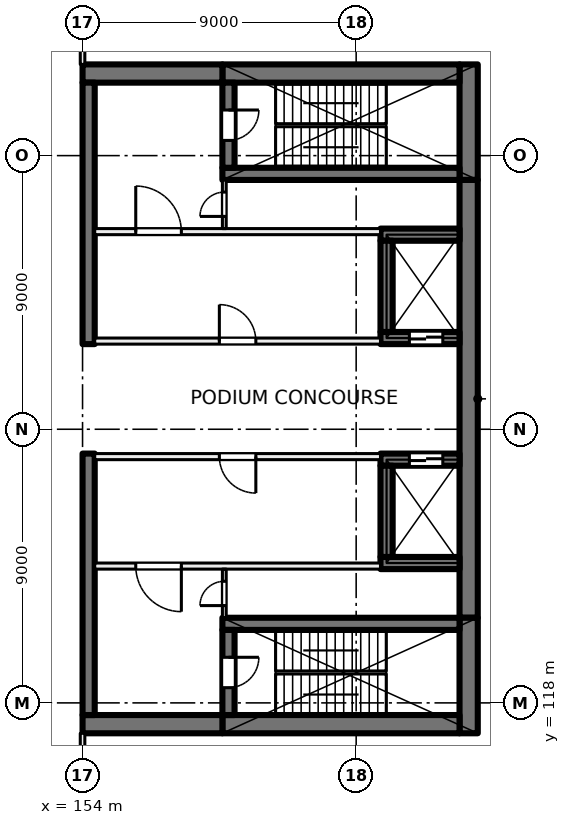
"""IFC4 building model, lengths in metres.
Left out: names, types, materials, properties, quantities, classifications, styles, units other than length and angle.
Written with IfcOpenShell. Run it as: python <this file> out.ifc"""

import sys

from ifc_helpers import new_model, si_unit, direction, frame, frame_2d, origin, place, context, subcontext, project, spatial, rectangle, extrude, element, fill, save


model = new_model("IFC4")
c1 = context("Model", 3, precision=1e-05, world=origin(), true_north=direction((0.0, 1.0)))
c2 = subcontext(c1, "Body", "Model", "MODEL_VIEW")
j1 = project(units=[si_unit("LENGTHUNIT", "METRE"), si_unit("PLANEANGLEUNIT", "RADIAN")], contexts=[c1])
p1 = place(None, origin())
s1 = spatial("IfcSite", under=j1, at=p1, CompositionType="ELEMENT")
p2 = place(p1, origin())
s2 = spatial("IfcBuilding", under=s1, at=p2, CompositionType="ELEMENT")
p3 = place(p2, frame((0.0, 0.0, 7.5)))
s3 = spatial("IfcBuildingStorey", under=s2, at=p3, CompositionType="ELEMENT", Elevation=7.5)
p4 = place(p3, frame((166.7, 139.0, 0.0), z_axis=(0.0, 0.0, 1.0), x_axis=(0.0, -1.0, 0.0)))
e1 = element("IfcWall", 1, at=p4, inside=s3, PredefinedType="SHEAR", context=c2, shape_type="SweptSolid", body=[
    extrude(rectangle(XDim=3.8, YDim=0.6, at=frame_2d((1.9, 0.0))), origin(), (0.0, 0.0, 1.0), 5.0),
])
p5 = place(p3, frame((166.7, 135.2, 0.0), z_axis=(0.0, 0.0, 1.0), x_axis=(0.0, -1.0, 0.0)))
e2 = element("IfcWall", 2, at=p5, inside=s3, PredefinedType="SHEAR", context=c2, shape_type="SweptSolid", body=[
    extrude(rectangle(XDim=14.4, YDim=0.6, at=frame_2d((7.2, 0.0))), origin(), (0.0, 0.0, 1.0), 5.0),
])
p6 = place(p3, frame((166.7, 120.8, 0.0), z_axis=(0.0, 0.0, 1.0), x_axis=(0.0, -1.0, 0.0)))
e3 = element("IfcWall", 3, at=p6, inside=s3, PredefinedType="SHEAR", context=c2, shape_type="SweptSolid", body=[
    extrude(rectangle(XDim=3.8, YDim=0.6, at=frame_2d((1.9, 0.0))), origin(), (0.0, 0.0, 1.0), 5.0),
])
for number, where, z_axis, x_axis in (
    (4, (166.4, 138.7, 0.0), (0.0, 0.0, 1.0), (-1.0, 0.0, 0.0)),
    (5, (166.4, 117.3, 0.0), (0.0, 0.0, 1.0), (-1.0, 0.0, 0.0)),
):
    element("IfcWall", number, at=place(p3, frame(where, z_axis=z_axis, x_axis=x_axis)), inside=s3, PredefinedType="SHEAR", context=c2, shape_type="SweptSolid", body=[
        extrude(rectangle(XDim=7.8, YDim=0.6, at=frame_2d((3.9, 0.0))), origin(), (0.0, 0.0, 1.0), 5.0),
    ])
for number, where, z_axis, x_axis in (
    (6, (158.6, 138.7, 0.0), (0.0, 0.0, 1.0), (-1.0, 0.0, 0.0)),
    (7, (158.6, 117.3, 0.0), (0.0, 0.0, 1.0), (-1.0, 0.0, 0.0)),
):
    element("IfcWall", number, at=place(p3, frame(where, z_axis=z_axis, x_axis=x_axis)), inside=s3, PredefinedType="SHEAR", context=c2, shape_type="SweptSolid", body=[
        extrude(rectangle(XDim=4.6, YDim=0.6, at=frame_2d((2.3, 0.0))), origin(), (0.0, 0.0, 1.0), 5.0),
    ])
p7 = place(p3, frame((166.4, 135.4, 0.0), z_axis=(0.0, 0.0, 1.0), x_axis=(-1.0, 0.0, 0.0)))
e8 = element("IfcWall", 8, at=p7, inside=s3, PredefinedType="SHEAR", context=c2, shape_type="SweptSolid", body=[
    extrude(rectangle(XDim=7.8, YDim=0.4, at=frame_2d((3.9, 0.0))), origin(), (0.0, 0.0, 1.0), 5.0),
])
p8 = place(p3, frame((158.8, 138.4, 0.0), z_axis=(0.0, 0.0, 1.0), x_axis=(0.0, -1.0, 0.0)))
e9 = element("IfcWall", 9, at=p8, inside=s3, PredefinedType="SHEAR", context=c2, shape_type="SweptSolid", body=[
    extrude(rectangle(XDim=2.8, YDim=0.4, at=frame_2d((1.4, 0.0))), origin(), (0.0, 0.0, 1.0), 5.0),
])
p9 = place(p8, frame((0.9, 0.0, 0.0)))
e10 = element("IfcOpeningElement", 10, at=p9, cuts=e9, PredefinedType="OPENING", context=c2, shape_type="SweptSolid", body=[
    extrude(rectangle(XDim=1.0, YDim=2.1, at=frame_2d((0.5, 1.05))), frame((0.0, 0.21, 0.0), z_axis=(0.0, -1.0, 0.0), x_axis=(1.0, 0.0, 0.0)), (0.0, 0.0, 1.0), 0.42),
])
p10 = place(p3, frame((166.4, 120.6, 0.0), z_axis=(0.0, 0.0, 1.0), x_axis=(-1.0, 0.0, 0.0)))
e11 = element("IfcWall", 11, at=p10, inside=s3, PredefinedType="SHEAR", context=c2, shape_type="SweptSolid", body=[
    extrude(rectangle(XDim=7.8, YDim=0.4, at=frame_2d((3.9, 0.0))), origin(), (0.0, 0.0, 1.0), 5.0),
])
p11 = place(p3, frame((158.8, 120.4, 0.0), z_axis=(0.0, 0.0, 1.0), x_axis=(0.0, -1.0, 0.0)))
e12 = element("IfcWall", 12, at=p11, inside=s3, PredefinedType="SHEAR", context=c2, shape_type="SweptSolid", body=[
    extrude(rectangle(XDim=2.8, YDim=0.4, at=frame_2d((1.4, 0.0))), origin(), (0.0, 0.0, 1.0), 5.0),
])
p12 = place(p11, frame((0.9, 0.0, 0.0)))
e13 = element("IfcOpeningElement", 13, at=p12, cuts=e12, PredefinedType="OPENING", context=c2, shape_type="SweptSolid", body=[
    extrude(rectangle(XDim=1.0, YDim=2.1, at=frame_2d((0.5, 1.05))), frame((0.0, 0.21, 0.0), z_axis=(0.0, -1.0, 0.0), x_axis=(1.0, 0.0, 0.0)), (0.0, 0.0, 1.0), 0.42),
])
p13 = place(p3, frame((166.4, 130.0, 0.0), z_axis=(0.0, 0.0, 1.0), x_axis=(-1.0, 0.0, 0.0)))
e14 = element("IfcWall", 14, at=p13, inside=s3, PredefinedType="SHEAR", context=c2, shape_type="SweptSolid", body=[
    extrude(rectangle(XDim=2.6, YDim=0.4, at=frame_2d((1.3, 0.0))), origin(), (0.0, 0.0, 1.0), 5.0),
])
p14 = place(p13, frame((0.55, 0.0, 0.0)))
e15 = element("IfcOpeningElement", 15, at=p14, cuts=e14, PredefinedType="OPENING", context=c2, shape_type="SweptSolid", body=[
    extrude(rectangle(XDim=1.1, YDim=2.1, at=frame_2d((0.55, 1.05))), frame((0.0, 0.21, 0.0), z_axis=(0.0, -1.0, 0.0), x_axis=(1.0, 0.0, 0.0)), (0.0, 0.0, 1.0), 0.42),
])
p15 = place(p3, frame((166.4, 133.4, 0.0), z_axis=(0.0, 0.0, 1.0), x_axis=(-1.0, 0.0, 0.0)))
e16 = element("IfcWall", 16, at=p15, inside=s3, PredefinedType="SHEAR", context=c2, shape_type="SweptSolid", body=[
    extrude(rectangle(XDim=2.6, YDim=0.4, at=frame_2d((1.3, 0.0))), origin(), (0.0, 0.0, 1.0), 5.0),
])
p16 = place(p3, frame((164.0, 133.2, 0.0), z_axis=(0.0, 0.0, 1.0), x_axis=(0.0, -1.0, 0.0)))
e17 = element("IfcWall", 17, at=p16, inside=s3, PredefinedType="SHEAR", context=c2, shape_type="SweptSolid", body=[
    extrude(rectangle(XDim=3.0, YDim=0.4, at=frame_2d((1.5, 0.0))), origin(), (0.0, 0.0, 1.0), 5.0),
])
p17 = place(p3, frame((166.4, 126.0, 0.0), z_axis=(0.0, 0.0, 1.0), x_axis=(-1.0, 0.0, 0.0)))
e18 = element("IfcWall", 18, at=p17, inside=s3, PredefinedType="SHEAR", context=c2, shape_type="SweptSolid", body=[
    extrude(rectangle(XDim=2.6, YDim=0.4, at=frame_2d((1.3, 0.0))), origin(), (0.0, 0.0, 1.0), 5.0),
])
p18 = place(p17, frame((0.55, 0.0, 0.0)))
e19 = element("IfcOpeningElement", 19, at=p18, cuts=e18, PredefinedType="OPENING", context=c2, shape_type="SweptSolid", body=[
    extrude(rectangle(XDim=1.1, YDim=2.1, at=frame_2d((0.55, 1.05))), frame((0.0, 0.21, 0.0), z_axis=(0.0, -1.0, 0.0), x_axis=(1.0, 0.0, 0.0)), (0.0, 0.0, 1.0), 0.42),
])
p19 = place(p3, frame((166.4, 122.6, 0.0), z_axis=(0.0, 0.0, 1.0), x_axis=(-1.0, 0.0, 0.0)))
e20 = element("IfcWall", 20, at=p19, inside=s3, PredefinedType="SHEAR", context=c2, shape_type="SweptSolid", body=[
    extrude(rectangle(XDim=2.6, YDim=0.4, at=frame_2d((1.3, 0.0))), origin(), (0.0, 0.0, 1.0), 5.0),
])
p20 = place(p3, frame((164.0, 125.8, 0.0), z_axis=(0.0, 0.0, 1.0), x_axis=(0.0, -1.0, 0.0)))
e21 = element("IfcWall", 21, at=p20, inside=s3, PredefinedType="SHEAR", context=c2, shape_type="SweptSolid", body=[
    extrude(rectangle(XDim=3.0, YDim=0.4, at=frame_2d((1.5, 0.0))), origin(), (0.0, 0.0, 1.0), 5.0),
])
for number, where, z_axis, x_axis in (
    (22, (154.2, 138.4, 0.0), (0.0, 0.0, 1.0), (0.0, -1.0, 0.0)),
    (23, (154.2, 126.2, 0.0), (0.0, 0.0, 1.0), (0.0, -1.0, 0.0)),
):
    element("IfcWall", number, at=place(p3, frame(where, z_axis=z_axis, x_axis=x_axis)), inside=s3, PredefinedType="SHEAR", context=c2, shape_type="SweptSolid", body=[
        extrude(rectangle(XDim=8.6, YDim=0.4, at=frame_2d((4.3, 0.0))), origin(), (0.0, 0.0, 1.0), 5.0),
    ])
p21 = place(p3, frame((163.8, 126.1, 0.0), z_axis=(0.0, 0.0, 1.0), x_axis=(-1.0, 0.0, 0.0)))
e24 = element("IfcWall", 24, at=p21, inside=s3, PredefinedType="PARTITIONING", context=c2, shape_type="SweptSolid", body=[
    extrude(rectangle(XDim=9.4, YDim=0.2, at=frame_2d((4.7, 0.0))), origin(), (0.0, 0.0, 1.0), 4.6),
])
p22 = place(p21, frame((4.1, 0.0, 0.0)))
e25 = element("IfcOpeningElement", 25, at=p22, cuts=e24, PredefinedType="OPENING", context=c2, shape_type="SweptSolid", body=[
    extrude(rectangle(XDim=1.2, YDim=2.1, at=frame_2d((0.6, 1.05))), frame((0.0, 0.11, 0.0), z_axis=(0.0, -1.0, 0.0), x_axis=(1.0, 0.0, 0.0)), (0.0, 0.0, 1.0), 0.22),
])
p23 = place(p3, frame((163.8, 122.5, 0.0), z_axis=(0.0, 0.0, 1.0), x_axis=(-1.0, 0.0, 0.0)))
e26 = element("IfcWall", 26, at=p23, inside=s3, PredefinedType="PARTITIONING", context=c2, shape_type="SweptSolid", body=[
    extrude(rectangle(XDim=9.4, YDim=0.2, at=frame_2d((4.7, 0.0))), origin(), (0.0, 0.0, 1.0), 4.6),
])
p24 = place(p23, frame((6.55, 0.0, 0.0)))
e27 = element("IfcOpeningElement", 27, at=p24, cuts=e26, PredefinedType="OPENING", context=c2, shape_type="SweptSolid", body=[
    extrude(rectangle(XDim=1.5, YDim=2.1, at=frame_2d((0.75, 1.05))), frame((0.0, 0.11, 0.0), z_axis=(0.0, -1.0, 0.0), x_axis=(1.0, 0.0, 0.0)), (0.0, 0.0, 1.0), 0.22),
])
p25 = place(p3, frame((158.663, 120.8, 0.0), z_axis=(0.0, 0.0, 1.0), x_axis=(0.0, 1.0, 0.0)))
e28 = element("IfcWall", 28, at=p25, inside=s3, PredefinedType="PARTITIONING", context=c2, shape_type="SweptSolid", body=[
    extrude(rectangle(XDim=1.6, YDim=0.125, at=frame_2d((0.8, 0.0))), origin(), (0.0, 0.0, 1.0), 4.6),
])
p26 = place(p25, frame((0.4, 0.0, 0.0)))
e29 = element("IfcOpeningElement", 29, at=p26, cuts=e28, PredefinedType="OPENING", context=c2, shape_type="SweptSolid", body=[
    extrude(rectangle(XDim=0.8, YDim=2.1, at=frame_2d((0.4, 1.05))), frame((0.0, 0.073, 0.0), z_axis=(0.0, -1.0, 0.0), x_axis=(1.0, 0.0, 0.0)), (0.0, 0.0, 1.0), 0.145),
])
p27 = place(p3, frame((154.4, 129.9, 0.0), z_axis=(0.0, 0.0, 1.0), x_axis=(1.0, 0.0, 0.0)))
e30 = element("IfcWall", 30, at=p27, inside=s3, PredefinedType="PARTITIONING", context=c2, shape_type="SweptSolid", body=[
    extrude(rectangle(XDim=9.4, YDim=0.2, at=frame_2d((4.7, 0.0))), origin(), (0.0, 0.0, 1.0), 4.6),
])
p28 = place(p27, frame((4.1, 0.0, 0.0)))
e31 = element("IfcOpeningElement", 31, at=p28, cuts=e30, PredefinedType="OPENING", context=c2, shape_type="SweptSolid", body=[
    extrude(rectangle(XDim=1.2, YDim=2.1, at=frame_2d((0.6, 1.05))), frame((0.0, 0.11, 0.0), z_axis=(0.0, -1.0, 0.0), x_axis=(1.0, 0.0, 0.0)), (0.0, 0.0, 1.0), 0.22),
])
p29 = place(p3, frame((154.4, 133.5, 0.0), z_axis=(0.0, 0.0, 1.0), x_axis=(1.0, 0.0, 0.0)))
e32 = element("IfcWall", 32, at=p29, inside=s3, PredefinedType="PARTITIONING", context=c2, shape_type="SweptSolid", body=[
    extrude(rectangle(XDim=9.4, YDim=0.2, at=frame_2d((4.7, 0.0))), origin(), (0.0, 0.0, 1.0), 4.6),
])
p30 = place(p29, frame((1.35, 0.0, 0.0)))
e33 = element("IfcOpeningElement", 33, at=p30, cuts=e32, PredefinedType="OPENING", context=c2, shape_type="SweptSolid", body=[
    extrude(rectangle(XDim=1.5, YDim=2.1, at=frame_2d((0.75, 1.05))), frame((0.0, 0.11, 0.0), z_axis=(0.0, -1.0, 0.0), x_axis=(1.0, 0.0, 0.0)), (0.0, 0.0, 1.0), 0.22),
])
p31 = place(p3, frame((158.663, 133.6, 0.0), z_axis=(0.0, 0.0, 1.0), x_axis=(0.0, 1.0, 0.0)))
e34 = element("IfcWall", 34, at=p31, inside=s3, PredefinedType="PARTITIONING", context=c2, shape_type="SweptSolid", body=[
    extrude(rectangle(XDim=1.6, YDim=0.125, at=frame_2d((0.8, 0.0))), origin(), (0.0, 0.0, 1.0), 4.6),
])
p32 = place(p31, frame((0.4, 0.0, 0.0)))
e35 = element("IfcOpeningElement", 35, at=p32, cuts=e34, PredefinedType="OPENING", context=c2, shape_type="SweptSolid", body=[
    extrude(rectangle(XDim=0.8, YDim=2.1, at=frame_2d((0.4, 1.05))), frame((0.0, 0.073, 0.0), z_axis=(0.0, -1.0, 0.0), x_axis=(1.0, 0.0, 0.0)), (0.0, 0.0, 1.0), 0.145),
])
p33 = place(p3, frame((154.0, 103.075, 0.0), z_axis=(0.0, 0.0, 1.0), x_axis=(0.0, 1.0, 0.0)))
e36 = element("IfcWall", 36, at=p33, inside=s3, PredefinedType="PARTITIONING", context=c2, shape_type="SweptSolid", body=[
    extrude(rectangle(XDim=13.925, YDim=0.15, at=frame_2d((6.962, 0.0))), origin(), (0.0, 0.0, 1.0), 4.6),
])
p34 = place(p3, frame((154.0, 153.4, 0.0), z_axis=(0.0, 0.0, 1.0), x_axis=(0.0, -1.0, 0.0)))
e37 = element("IfcWall", 37, at=p34, inside=s3, PredefinedType="PARTITIONING", context=c2, shape_type="SweptSolid", body=[
    extrude(rectangle(XDim=14.4, YDim=0.15, at=frame_2d((7.2, 0.0))), origin(), (0.0, 0.0, 1.0), 4.6),
])
p35 = place(p34, frame((11.0, 0.0, 0.0)))
e38 = element("IfcOpeningElement", 38, at=p35, cuts=e37, PredefinedType="OPENING", context=c2, shape_type="SweptSolid", body=[
    extrude(rectangle(XDim=1.8, YDim=2.1, at=frame_2d((0.9, 1.05))), frame((0.0, 0.085, 0.0), z_axis=(0.0, -1.0, 0.0), x_axis=(1.0, 0.0, 0.0)), (0.0, 0.0, 1.0), 0.17),
])
p36 = place(p18, origin())
e39 = element("IfcDoor", 39, at=p36, inside=s3, OperationType="DOUBLE_DOOR_SLIDING", PredefinedType="DOOR", context=c2, shape_type="SweptSolid", body=[
    extrude(rectangle(XDim=1.1, YDim=2.1, at=frame_2d((0.55, 1.05))), frame((0.0, 0.025, 0.0), z_axis=(0.0, -1.0, 0.0), x_axis=(1.0, 0.0, 0.0)), (0.0, 0.0, 1.0), 0.05),
])
fill(e19, e39)
p37 = place(p14, origin())
e40 = element("IfcDoor", 40, at=p37, inside=s3, OperationType="DOUBLE_DOOR_SLIDING", PredefinedType="DOOR", context=c2, shape_type="SweptSolid", body=[
    extrude(rectangle(XDim=1.1, YDim=2.1, at=frame_2d((0.55, 1.05))), frame((0.0, 0.025, 0.0), z_axis=(0.0, -1.0, 0.0), x_axis=(1.0, 0.0, 0.0)), (0.0, 0.0, 1.0), 0.05),
])
fill(e15, e40)
p38 = place(p22, origin())
e41 = element("IfcDoor", 41, at=p38, inside=s3, OperationType="DOUBLE_DOOR_SINGLE_SWING", PredefinedType="DOOR", context=c2, shape_type="SweptSolid", body=[
    extrude(rectangle(XDim=1.2, YDim=2.1, at=frame_2d((0.6, 1.05))), frame((0.0, 0.025, 0.0), z_axis=(0.0, -1.0, 0.0), x_axis=(1.0, 0.0, 0.0)), (0.0, 0.0, 1.0), 0.05),
])
fill(e25, e41)
p39 = place(p24, origin())
e42 = element("IfcDoor", 42, at=p39, inside=s3, OperationType="DOUBLE_DOOR_SINGLE_SWING", PredefinedType="DOOR", context=c2, shape_type="SweptSolid", body=[
    extrude(rectangle(XDim=1.5, YDim=2.1, at=frame_2d((0.75, 1.05))), frame((0.0, 0.025, 0.0), z_axis=(0.0, -1.0, 0.0), x_axis=(1.0, 0.0, 0.0)), (0.0, 0.0, 1.0), 0.05),
])
fill(e27, e42)
p40 = place(p12, origin())
e43 = element("IfcDoor", 43, at=p40, inside=s3, OperationType="SINGLE_SWING_LEFT", PredefinedType="DOOR", context=c2, shape_type="SweptSolid", body=[
    extrude(rectangle(XDim=1.0, YDim=2.1, at=frame_2d((0.5, 1.05))), frame((0.0, 0.025, 0.0), z_axis=(0.0, -1.0, 0.0), x_axis=(1.0, 0.0, 0.0)), (0.0, 0.0, 1.0), 0.05),
])
fill(e13, e43)
p41 = place(p26, origin())
e44 = element("IfcDoor", 44, at=p41, inside=s3, OperationType="SINGLE_SWING_RIGHT", PredefinedType="DOOR", context=c2, shape_type="SweptSolid", body=[
    extrude(rectangle(XDim=0.8, YDim=2.1, at=frame_2d((0.4, 1.05))), frame((0.0, 0.025, 0.0), z_axis=(0.0, -1.0, 0.0), x_axis=(1.0, 0.0, 0.0)), (0.0, 0.0, 1.0), 0.05),
])
fill(e29, e44)
p42 = place(p28, origin())
e45 = element("IfcDoor", 45, at=p42, inside=s3, OperationType="DOUBLE_DOOR_SINGLE_SWING", PredefinedType="DOOR", context=c2, shape_type="SweptSolid", body=[
    extrude(rectangle(XDim=1.2, YDim=2.1, at=frame_2d((0.6, 1.05))), frame((0.0, 0.025, 0.0), z_axis=(0.0, -1.0, 0.0), x_axis=(1.0, 0.0, 0.0)), (0.0, 0.0, 1.0), 0.05),
])
fill(e31, e45)
p43 = place(p30, origin())
e46 = element("IfcDoor", 46, at=p43, inside=s3, OperationType="DOUBLE_DOOR_SINGLE_SWING", PredefinedType="DOOR", context=c2, shape_type="SweptSolid", body=[
    extrude(rectangle(XDim=1.5, YDim=2.1, at=frame_2d((0.75, 1.05))), frame((0.0, 0.025, 0.0), z_axis=(0.0, -1.0, 0.0), x_axis=(1.0, 0.0, 0.0)), (0.0, 0.0, 1.0), 0.05),
])
fill(e33, e46)
p44 = place(p9, origin())
e47 = element("IfcDoor", 47, at=p44, inside=s3, OperationType="SINGLE_SWING_RIGHT", PredefinedType="DOOR", context=c2, shape_type="SweptSolid", body=[
    extrude(rectangle(XDim=1.0, YDim=2.1, at=frame_2d((0.5, 1.05))), frame((0.0, 0.025, 0.0), z_axis=(0.0, -1.0, 0.0), x_axis=(1.0, 0.0, 0.0)), (0.0, 0.0, 1.0), 0.05),
])
fill(e10, e47)
p45 = place(p32, origin())
e48 = element("IfcDoor", 48, at=p45, inside=s3, OperationType="SINGLE_SWING_LEFT", PredefinedType="DOOR", context=c2, shape_type="SweptSolid", body=[
    extrude(rectangle(XDim=0.8, YDim=2.1, at=frame_2d((0.4, 1.05))), frame((0.0, 0.025, 0.0), z_axis=(0.0, -1.0, 0.0), x_axis=(1.0, 0.0, 0.0)), (0.0, 0.0, 1.0), 0.05),
])
fill(e35, e48)
save(model, sys.argv[1])
